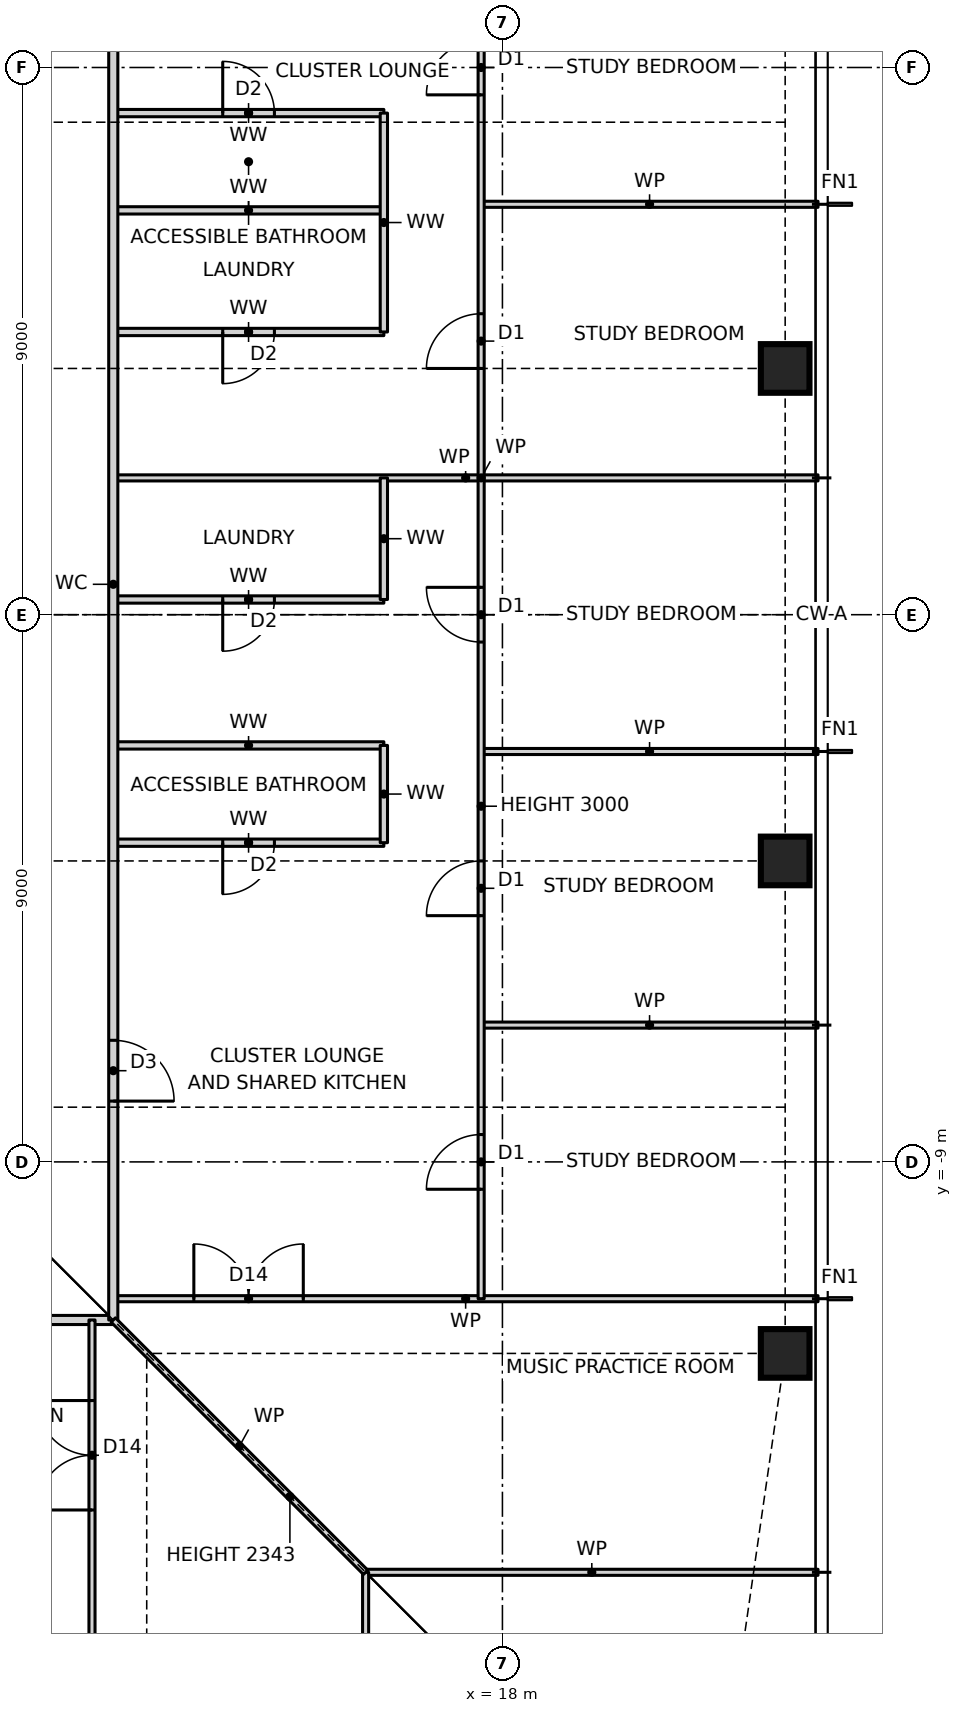
"""IFC4 building model, lengths in metres.
Left out: names, types, materials, properties, quantities, classifications, styles, units other than length and angle.
Written with IfcOpenShell. Run it as: python <this file> out.ifc"""

import sys

from ifc_helpers import new_model, si_unit, direction, frame, frame_2d, origin, origin_2d, place, context, subcontext, project, spatial, rectangle, hollow_rectangle, extrude, element, fill, save


model = new_model("IFC4")
c1 = context("Model", 3, precision=1e-05, world=origin(), true_north=direction((0.0, 1.0)))
c2 = subcontext(c1, "Body", "Model", "MODEL_VIEW")
j1 = project(units=[si_unit("LENGTHUNIT", "METRE"), si_unit("PLANEANGLEUNIT", "RADIAN")], contexts=[c1])
p1 = place(None, origin())
s1 = spatial("IfcSite", under=j1, at=p1, CompositionType="ELEMENT")
p2 = place(p1, origin())
s2 = spatial("IfcBuilding", under=s1, at=p2, CompositionType="ELEMENT")
p3 = place(p2, frame((0.0, 0.0, 39.5)))
s3 = spatial("IfcBuildingStorey", under=s2, at=p3, CompositionType="ELEMENT", Elevation=39.5)
for number, where, z_axis, x_axis in (
    (1, (22.65, -12.15, 0.0), (0.0, 0.0, 1.0), (1.0, 0.0, 0.0)),
    (2, (22.65, -4.05, 0.0), (0.0, 0.0, 1.0), (1.0, 0.0, 0.0)),
    (3, (22.65, 4.05, 0.0), (0.0, 0.0, 1.0), (1.0, 0.0, 0.0)),
):
    element("IfcColumn", number, at=place(p3, frame(where, z_axis=z_axis, x_axis=x_axis)), inside=s3, PredefinedType="COLUMN", context=c2, shape_type="SweptSolid", body=[
        extrude(hollow_rectangle(XDim=0.8, YDim=0.8, WallThickness=0.09, at=origin_2d()), origin(), (0.0, 0.0, 1.0), 3.5),
    ])
p4 = place(p3, frame((15.75, -15.75, 0.0), z_axis=(0.0, 0.0, 1.0), x_axis=(1.0, 0.0, 0.0)))
e4 = element("IfcWall", 4, at=p4, inside=s3, PredefinedType="PARTITIONING", context=c2, shape_type="SweptSolid", body=[
    extrude(rectangle(XDim=7.44, YDim=0.1, at=frame_2d((3.72, 0.0))), origin(), (0.0, 0.0, 1.0), 3.27),
])
p5 = place(p3, frame((-11.6, -11.6, 0.0), z_axis=(0.0, 0.0, 1.0), x_axis=(1.0, 0.0, 0.0)))
e5 = element("IfcWall", 5, at=p5, inside=s3, PredefinedType="PARTITIONING", context=c2, shape_type="SweptSolid", body=[
    extrude(rectangle(XDim=23.2, YDim=0.15, at=frame_2d((11.6, 0.0))), origin(), (0.0, 0.0, 1.0), 3.27),
])
p6 = place(p5, frame((2.975, 0.0, 0.0)))
e6 = element("IfcOpeningElement", 6, at=p6, cuts=e5, PredefinedType="OPENING", context=c2, shape_type="SweptSolid", body=[
    extrude(rectangle(XDim=1.0, YDim=2.1, at=frame_2d((0.5, 1.05))), frame((0.0, 0.085, 0.0), z_axis=(0.0, -1.0, 0.0), x_axis=(1.0, 0.0, 0.0)), (0.0, 0.0, 1.0), 0.17),
])
p7 = place(p5, frame((18.6, 0.0, 0.0)))
e7 = element("IfcOpeningElement", 7, at=p7, cuts=e5, PredefinedType="OPENING", context=c2, shape_type="SweptSolid", body=[
    extrude(rectangle(XDim=1.0, YDim=2.1, at=frame_2d((0.5, 1.05))), frame((0.0, 0.085, 0.0), z_axis=(0.0, -1.0, 0.0), x_axis=(1.0, 0.0, 0.0)), (0.0, 0.0, 1.0), 0.17),
])
p8 = place(p3, frame((11.6, -11.25, 0.0), z_axis=(0.0, 0.0, 1.0), x_axis=(1.0, 0.0, 0.0)))
e8 = element("IfcWall", 8, at=p8, inside=s3, PredefinedType="PARTITIONING", context=c2, shape_type="SweptSolid", body=[
    extrude(rectangle(XDim=11.59, YDim=0.1, at=frame_2d((5.795, 0.0))), origin(), (0.0, 0.0, 1.0), 3.27),
])
p9 = place(p8, frame((1.325, 0.0, 0.0)))
e9 = element("IfcOpeningElement", 9, at=p9, cuts=e8, PredefinedType="OPENING", context=c2, shape_type="SweptSolid", body=[
    extrude(rectangle(XDim=1.8, YDim=2.1, at=frame_2d((0.9, 1.05))), frame((0.0, 0.06, 0.0), z_axis=(0.0, -1.0, 0.0), x_axis=(1.0, 0.0, 0.0)), (0.0, 0.0, 1.0), 0.12),
])
p10 = place(p3, frame((17.65, -6.75, 0.0), z_axis=(0.0, 0.0, 1.0), x_axis=(1.0, 0.0, 0.0)))
e10 = element("IfcWall", 10, at=p10, inside=s3, PredefinedType="PARTITIONING", context=c2, shape_type="SweptSolid", body=[
    extrude(rectangle(XDim=5.54, YDim=0.1, at=frame_2d((2.77, 0.0))), origin(), (0.0, 0.0, 1.0), 3.27),
])
p11 = place(p3, frame((11.6, -3.75, 0.0), z_axis=(0.0, 0.0, 1.0), x_axis=(1.0, 0.0, 0.0)))
e11 = element("IfcWall", 11, at=p11, inside=s3, PredefinedType="PARTITIONING", context=c2, shape_type="SweptSolid", body=[
    extrude(rectangle(XDim=4.45, YDim=0.12, at=frame_2d((2.225, 0.0))), origin(), (0.0, 0.0, 1.0), 3.27),
])
p12 = place(p11, frame((1.8, 0.0, 0.0)))
e12 = element("IfcOpeningElement", 12, at=p12, cuts=e11, PredefinedType="OPENING", context=c2, shape_type="SweptSolid", body=[
    extrude(rectangle(XDim=0.85, YDim=2.1, at=frame_2d((0.425, 1.05))), frame((0.0, 0.07, 0.0), z_axis=(0.0, -1.0, 0.0), x_axis=(1.0, 0.0, 0.0)), (0.0, 0.0, 1.0), 0.14),
])
p13 = place(p3, frame((17.65, -2.25, 0.0), z_axis=(0.0, 0.0, 1.0), x_axis=(1.0, 0.0, 0.0)))
e13 = element("IfcWall", 13, at=p13, inside=s3, PredefinedType="PARTITIONING", context=c2, shape_type="SweptSolid", body=[
    extrude(rectangle(XDim=5.54, YDim=0.1, at=frame_2d((2.77, 0.0))), origin(), (0.0, 0.0, 1.0), 3.27),
])
p14 = place(p3, frame((11.6, -2.15, 0.0), z_axis=(0.0, 0.0, 1.0), x_axis=(1.0, 0.0, 0.0)))
e14 = element("IfcWall", 14, at=p14, inside=s3, PredefinedType="PARTITIONING", context=c2, shape_type="SweptSolid", body=[
    extrude(rectangle(XDim=4.45, YDim=0.12, at=frame_2d((2.225, 0.0))), origin(), (0.0, 0.0, 1.0), 3.27),
])
p15 = place(p3, frame((11.6, 0.25, 0.0), z_axis=(0.0, 0.0, 1.0), x_axis=(1.0, 0.0, 0.0)))
e15 = element("IfcWall", 15, at=p15, inside=s3, PredefinedType="PARTITIONING", context=c2, shape_type="SweptSolid", body=[
    extrude(rectangle(XDim=4.45, YDim=0.12, at=frame_2d((2.225, 0.0))), origin(), (0.0, 0.0, 1.0), 3.27),
])
p16 = place(p15, frame((1.8, 0.0, 0.0)))
e16 = element("IfcOpeningElement", 16, at=p16, cuts=e15, PredefinedType="OPENING", context=c2, shape_type="SweptSolid", body=[
    extrude(rectangle(XDim=0.85, YDim=2.1, at=frame_2d((0.425, 1.05))), frame((0.0, 0.07, 0.0), z_axis=(0.0, -1.0, 0.0), x_axis=(1.0, 0.0, 0.0)), (0.0, 0.0, 1.0), 0.14),
])
p17 = place(p3, frame((11.6, 2.25, 0.0), z_axis=(0.0, 0.0, 1.0), x_axis=(1.0, 0.0, 0.0)))
e17 = element("IfcWall", 17, at=p17, inside=s3, PredefinedType="PARTITIONING", context=c2, shape_type="SweptSolid", body=[
    extrude(rectangle(XDim=11.59, YDim=0.1, at=frame_2d((5.795, 0.0))), origin(), (0.0, 0.0, 1.0), 3.27),
])
p18 = place(p3, frame((11.6, 4.65, 0.0), z_axis=(0.0, 0.0, 1.0), x_axis=(1.0, 0.0, 0.0)))
e18 = element("IfcWall", 18, at=p18, inside=s3, PredefinedType="PARTITIONING", context=c2, shape_type="SweptSolid", body=[
    extrude(rectangle(XDim=4.45, YDim=0.12, at=frame_2d((2.225, 0.0))), origin(), (0.0, 0.0, 1.0), 3.27),
])
p19 = place(p18, frame((1.8, 0.0, 0.0)))
e19 = element("IfcOpeningElement", 19, at=p19, cuts=e18, PredefinedType="OPENING", context=c2, shape_type="SweptSolid", body=[
    extrude(rectangle(XDim=0.85, YDim=2.1, at=frame_2d((0.425, 1.05))), frame((0.0, 0.07, 0.0), z_axis=(0.0, -1.0, 0.0), x_axis=(1.0, 0.0, 0.0)), (0.0, 0.0, 1.0), 0.14),
])
p20 = place(p3, frame((11.6, 6.65, 0.0), z_axis=(0.0, 0.0, 1.0), x_axis=(1.0, 0.0, 0.0)))
e20 = element("IfcWall", 20, at=p20, inside=s3, PredefinedType="PARTITIONING", context=c2, shape_type="SweptSolid", body=[
    extrude(rectangle(XDim=4.45, YDim=0.12, at=frame_2d((2.225, 0.0))), origin(), (0.0, 0.0, 1.0), 3.27),
])
p21 = place(p3, frame((17.65, 6.75, 0.0), z_axis=(0.0, 0.0, 1.0), x_axis=(1.0, 0.0, 0.0)))
e21 = element("IfcWall", 21, at=p21, inside=s3, PredefinedType="PARTITIONING", context=c2, shape_type="SweptSolid", body=[
    extrude(rectangle(XDim=5.54, YDim=0.1, at=frame_2d((2.77, 0.0))), origin(), (0.0, 0.0, 1.0), 3.27),
])
p22 = place(p3, frame((11.6, 8.25, 0.0), z_axis=(0.0, 0.0, 1.0), x_axis=(1.0, 0.0, 0.0)))
e22 = element("IfcWall", 22, at=p22, inside=s3, PredefinedType="PARTITIONING", context=c2, shape_type="SweptSolid", body=[
    extrude(rectangle(XDim=4.45, YDim=0.12, at=frame_2d((2.225, 0.0))), origin(), (0.0, 0.0, 1.0), 3.27),
])
p23 = place(p22, frame((1.8, 0.0, 0.0)))
e23 = element("IfcOpeningElement", 23, at=p23, cuts=e22, PredefinedType="OPENING", context=c2, shape_type="SweptSolid", body=[
    extrude(rectangle(XDim=0.85, YDim=2.1, at=frame_2d((0.425, 1.05))), frame((0.0, 0.07, 0.0), z_axis=(0.0, -1.0, 0.0), x_axis=(1.0, 0.0, 0.0)), (0.0, 0.0, 1.0), 0.14),
])
p24 = place(p3, frame((17.65, -11.25, 0.0), z_axis=(0.0, 0.0, 1.0), x_axis=(0.0, 1.0, 0.0)))
e24 = element("IfcWall", 24, at=p24, inside=s3, PredefinedType="PARTITIONING", context=c2, shape_type="SweptSolid", body=[
    extrude(rectangle(XDim=27.0, YDim=0.1, at=frame_2d((13.5, 0.0))), origin(), (0.0, 0.0, 1.0), 3.0),
])
p25 = place(p24, frame((1.8, 0.0, 0.0)))
e25 = element("IfcOpeningElement", 25, at=p25, cuts=e24, PredefinedType="OPENING", context=c2, shape_type="SweptSolid", body=[
    extrude(rectangle(XDim=0.9, YDim=2.1, at=frame_2d((0.45, 1.05))), frame((0.0, 0.06, 0.0), z_axis=(0.0, -1.0, 0.0), x_axis=(1.0, 0.0, 0.0)), (0.0, 0.0, 1.0), 0.12),
])
p26 = place(p24, frame((6.3, 0.0, 0.0)))
e26 = element("IfcOpeningElement", 26, at=p26, cuts=e24, PredefinedType="OPENING", context=c2, shape_type="SweptSolid", body=[
    extrude(rectangle(XDim=0.9, YDim=2.1, at=frame_2d((0.45, 1.05))), frame((0.0, 0.06, 0.0), z_axis=(0.0, -1.0, 0.0), x_axis=(1.0, 0.0, 0.0)), (0.0, 0.0, 1.0), 0.12),
])
p27 = place(p24, frame((10.8, 0.0, 0.0)))
e27 = element("IfcOpeningElement", 27, at=p27, cuts=e24, PredefinedType="OPENING", context=c2, shape_type="SweptSolid", body=[
    extrude(rectangle(XDim=0.9, YDim=2.1, at=frame_2d((0.45, 1.05))), frame((0.0, 0.06, 0.0), z_axis=(0.0, -1.0, 0.0), x_axis=(1.0, 0.0, 0.0)), (0.0, 0.0, 1.0), 0.12),
])
p28 = place(p24, frame((15.3, 0.0, 0.0)))
e28 = element("IfcOpeningElement", 28, at=p28, cuts=e24, PredefinedType="OPENING", context=c2, shape_type="SweptSolid", body=[
    extrude(rectangle(XDim=0.9, YDim=2.1, at=frame_2d((0.45, 1.05))), frame((0.0, 0.06, 0.0), z_axis=(0.0, -1.0, 0.0), x_axis=(1.0, 0.0, 0.0)), (0.0, 0.0, 1.0), 0.12),
])
p29 = place(p24, frame((19.8, 0.0, 0.0)))
e29 = element("IfcOpeningElement", 29, at=p29, cuts=e24, PredefinedType="OPENING", context=c2, shape_type="SweptSolid", body=[
    extrude(rectangle(XDim=0.9, YDim=2.1, at=frame_2d((0.45, 1.05))), frame((0.0, 0.06, 0.0), z_axis=(0.0, -1.0, 0.0), x_axis=(1.0, 0.0, 0.0)), (0.0, 0.0, 1.0), 0.12),
])
p30 = place(p24, frame((24.3, 0.0, 0.0)))
e30 = element("IfcOpeningElement", 30, at=p30, cuts=e24, PredefinedType="OPENING", context=c2, shape_type="SweptSolid", body=[
    extrude(rectangle(XDim=0.9, YDim=2.1, at=frame_2d((0.45, 1.05))), frame((0.0, 0.06, 0.0), z_axis=(0.0, -1.0, 0.0), x_axis=(1.0, 0.0, 0.0)), (0.0, 0.0, 1.0), 0.12),
])
p31 = place(p3, frame((16.05, -3.75, 0.0), z_axis=(0.0, 0.0, 1.0), x_axis=(0.0, 1.0, 0.0)))
e31 = element("IfcWall", 31, at=p31, inside=s3, PredefinedType="PARTITIONING", context=c2, shape_type="SweptSolid", body=[
    extrude(rectangle(XDim=1.6, YDim=0.12, at=frame_2d((0.8, 0.0))), origin(), (0.0, 0.0, 1.0), 3.27),
])
p32 = place(p3, frame((16.05, 0.25, 0.0), z_axis=(0.0, 0.0, 1.0), x_axis=(0.0, 1.0, 0.0)))
e32 = element("IfcWall", 32, at=p32, inside=s3, PredefinedType="PARTITIONING", context=c2, shape_type="SweptSolid", body=[
    extrude(rectangle(XDim=2.0, YDim=0.12, at=frame_2d((1.0, 0.0))), origin(), (0.0, 0.0, 1.0), 3.27),
])
p33 = place(p3, frame((16.05, 4.65, 0.0), z_axis=(0.0, 0.0, 1.0), x_axis=(0.0, 1.0, 0.0)))
e33 = element("IfcWall", 33, at=p33, inside=s3, PredefinedType="PARTITIONING", context=c2, shape_type="SweptSolid", body=[
    extrude(rectangle(XDim=3.6, YDim=0.12, at=frame_2d((1.8, 0.0))), origin(), (0.0, 0.0, 1.0), 3.27),
])
p34 = place(p3, frame((15.75, -23.19, 0.0), z_axis=(0.0, 0.0, 1.0), x_axis=(0.0, 1.0, 0.0)))
e34 = element("IfcWall", 34, at=p34, inside=s3, PredefinedType="PARTITIONING", context=c2, shape_type="SweptSolid", body=[
    extrude(rectangle(XDim=7.44, YDim=0.1, at=frame_2d((3.72, 0.0))), origin(), (0.0, 0.0, 1.0), 3.27),
])
p35 = place(p34, frame((3.295, 0.0, 0.0)))
e35 = element("IfcOpeningElement", 35, at=p35, cuts=e34, PredefinedType="OPENING", context=c2, shape_type="SweptSolid", body=[
    extrude(rectangle(XDim=0.85, YDim=2.1, at=frame_2d((0.425, 1.05))), frame((0.0, 0.06, 0.0), z_axis=(0.0, -1.0, 0.0), x_axis=(1.0, 0.0, 0.0)), (0.0, 0.0, 1.0), 0.12),
])
p36 = place(p3, frame((11.6, -11.6, 0.0), z_axis=(0.0, 0.0, 1.0), x_axis=(0.0, 1.0, 0.0)))
e36 = element("IfcWall", 36, at=p36, inside=s3, PredefinedType="PARTITIONING", context=c2, shape_type="SweptSolid", body=[
    extrude(rectangle(XDim=24.2, YDim=0.15, at=frame_2d((12.1, 0.0))), origin(), (0.0, 0.0, 1.0), 3.27),
])
p37 = place(p36, frame((3.6, 0.0, 0.0)))
e37 = element("IfcOpeningElement", 37, at=p37, cuts=e36, PredefinedType="OPENING", context=c2, shape_type="SweptSolid", body=[
    extrude(rectangle(XDim=1.0, YDim=2.1, at=frame_2d((0.5, 1.05))), frame((0.0, 0.085, 0.0), z_axis=(0.0, -1.0, 0.0), x_axis=(1.0, 0.0, 0.0)), (0.0, 0.0, 1.0), 0.17),
])
p38 = place(p36, frame((21.025, 0.0, 0.0)))
e38 = element("IfcOpeningElement", 38, at=p38, cuts=e36, PredefinedType="OPENING", context=c2, shape_type="SweptSolid", body=[
    extrude(rectangle(XDim=1.0, YDim=2.1, at=frame_2d((0.5, 1.05))), frame((0.0, 0.085, 0.0), z_axis=(0.0, -1.0, 0.0), x_axis=(1.0, 0.0, 0.0)), (0.0, 0.0, 1.0), 0.17),
])
p39 = place(p3, frame((11.25, -23.19, 0.0), z_axis=(0.0, 0.0, 1.0), x_axis=(0.0, 1.0, 0.0)))
e39 = element("IfcWall", 39, at=p39, inside=s3, PredefinedType="PARTITIONING", context=c2, shape_type="SweptSolid", body=[
    extrude(rectangle(XDim=11.59, YDim=0.1, at=frame_2d((5.795, 0.0))), origin(), (0.0, 0.0, 1.0), 3.27),
])
p40 = place(p39, frame((8.465, 0.0, 0.0)))
e40 = element("IfcOpeningElement", 40, at=p40, cuts=e39, PredefinedType="OPENING", context=c2, shape_type="SweptSolid", body=[
    extrude(rectangle(XDim=1.8, YDim=2.1, at=frame_2d((0.9, 1.05))), frame((0.0, 0.06, 0.0), z_axis=(0.0, -1.0, 0.0), x_axis=(1.0, 0.0, 0.0)), (0.0, 0.0, 1.0), 0.12),
])
p41 = place(p3, frame((15.75, -15.75, 0.0), z_axis=(0.0, 0.0, 1.0), x_axis=(-0.707106781187, 0.707106781187, 0.0)))
e41 = element("IfcWall", 41, at=p41, inside=s3, PredefinedType="PARTITIONING", context=c2, shape_type="SweptSolid", body=[
    extrude(rectangle(XDim=5.869, YDim=0.1, at=frame_2d((2.935, 0.0))), origin(), (0.0, 0.0, 1.0), 2.343),
])
p42 = place(p40, origin())
e42 = element("IfcDoor", 42, at=p42, inside=s3, OperationType="DOUBLE_DOOR_SINGLE_SWING", PredefinedType="DOOR", context=c2, shape_type="SweptSolid", body=[
    extrude(rectangle(XDim=1.8, YDim=2.1, at=frame_2d((0.9, 1.05))), frame((0.0, 0.025, 0.0), z_axis=(0.0, -1.0, 0.0), x_axis=(1.0, 0.0, 0.0)), (0.0, 0.0, 1.0), 0.05),
])
fill(e40, e42)
p43 = place(p9, origin())
e43 = element("IfcDoor", 43, at=p43, inside=s3, OperationType="DOUBLE_DOOR_SINGLE_SWING", PredefinedType="DOOR", context=c2, shape_type="SweptSolid", body=[
    extrude(rectangle(XDim=1.8, YDim=2.1, at=frame_2d((0.9, 1.05))), frame((0.0, 0.025, 0.0), z_axis=(0.0, -1.0, 0.0), x_axis=(1.0, 0.0, 0.0)), (0.0, 0.0, 1.0), 0.05),
])
fill(e9, e43)
p44 = place(p25, origin())
e44 = element("IfcDoor", 44, at=p44, inside=s3, OperationType="SINGLE_SWING_LEFT", PredefinedType="DOOR", context=c2, shape_type="SweptSolid", body=[
    extrude(rectangle(XDim=0.9, YDim=2.1, at=frame_2d((0.45, 1.05))), frame((0.0, 0.025, 0.0), z_axis=(0.0, -1.0, 0.0), x_axis=(1.0, 0.0, 0.0)), (0.0, 0.0, 1.0), 0.05),
])
fill(e25, e44)
p45 = place(p26, origin())
e45 = element("IfcDoor", 45, at=p45, inside=s3, OperationType="SINGLE_SWING_LEFT", PredefinedType="DOOR", context=c2, shape_type="SweptSolid", body=[
    extrude(rectangle(XDim=0.9, YDim=2.1, at=frame_2d((0.45, 1.05))), frame((0.0, 0.025, 0.0), z_axis=(0.0, -1.0, 0.0), x_axis=(1.0, 0.0, 0.0)), (0.0, 0.0, 1.0), 0.05),
])
fill(e26, e45)
p46 = place(p27, origin())
e46 = element("IfcDoor", 46, at=p46, inside=s3, OperationType="SINGLE_SWING_RIGHT", PredefinedType="DOOR", context=c2, shape_type="SweptSolid", body=[
    extrude(rectangle(XDim=0.9, YDim=2.1, at=frame_2d((0.45, 1.05))), frame((0.0, 0.025, 0.0), z_axis=(0.0, -1.0, 0.0), x_axis=(1.0, 0.0, 0.0)), (0.0, 0.0, 1.0), 0.05),
])
fill(e27, e46)
p47 = place(p37, frame((1.0, 0.0, 0.0), z_axis=(0.0, 0.0, 1.0), x_axis=(-1.0, 0.0, 0.0)))
e47 = element("IfcDoor", 47, at=p47, inside=s3, OperationType="SINGLE_SWING_RIGHT", PredefinedType="DOOR", context=c2, shape_type="SweptSolid", body=[
    extrude(rectangle(XDim=1.0, YDim=2.1, at=frame_2d((0.5, 1.05))), frame((0.0, 0.025, 0.0), z_axis=(0.0, -1.0, 0.0), x_axis=(1.0, 0.0, 0.0)), (0.0, 0.0, 1.0), 0.05),
])
fill(e37, e47)
p48 = place(p12, frame((0.85, 0.0, 0.0), z_axis=(0.0, 0.0, 1.0), x_axis=(-1.0, 0.0, 0.0)))
e48 = element("IfcDoor", 48, at=p48, inside=s3, OperationType="SINGLE_SWING_RIGHT", PredefinedType="DOOR", context=c2, shape_type="SweptSolid", body=[
    extrude(rectangle(XDim=0.85, YDim=2.1, at=frame_2d((0.425, 1.05))), frame((0.0, 0.025, 0.0), z_axis=(0.0, -1.0, 0.0), x_axis=(1.0, 0.0, 0.0)), (0.0, 0.0, 1.0), 0.05),
])
fill(e12, e48)
p49 = place(p16, frame((0.85, 0.0, 0.0), z_axis=(0.0, 0.0, 1.0), x_axis=(-1.0, 0.0, 0.0)))
e49 = element("IfcDoor", 49, at=p49, inside=s3, OperationType="SINGLE_SWING_RIGHT", PredefinedType="DOOR", context=c2, shape_type="SweptSolid", body=[
    extrude(rectangle(XDim=0.85, YDim=2.1, at=frame_2d((0.425, 1.05))), frame((0.0, 0.025, 0.0), z_axis=(0.0, -1.0, 0.0), x_axis=(1.0, 0.0, 0.0)), (0.0, 0.0, 1.0), 0.05),
])
fill(e16, e49)
p50 = place(p28, origin())
e50 = element("IfcDoor", 50, at=p50, inside=s3, OperationType="SINGLE_SWING_LEFT", PredefinedType="DOOR", context=c2, shape_type="SweptSolid", body=[
    extrude(rectangle(XDim=0.9, YDim=2.1, at=frame_2d((0.45, 1.05))), frame((0.0, 0.025, 0.0), z_axis=(0.0, -1.0, 0.0), x_axis=(1.0, 0.0, 0.0)), (0.0, 0.0, 1.0), 0.05),
])
fill(e28, e50)
p51 = place(p29, origin())
e51 = element("IfcDoor", 51, at=p51, inside=s3, OperationType="SINGLE_SWING_LEFT", PredefinedType="DOOR", context=c2, shape_type="SweptSolid", body=[
    extrude(rectangle(XDim=0.9, YDim=2.1, at=frame_2d((0.45, 1.05))), frame((0.0, 0.025, 0.0), z_axis=(0.0, -1.0, 0.0), x_axis=(1.0, 0.0, 0.0)), (0.0, 0.0, 1.0), 0.05),
])
fill(e29, e51)
p52 = place(p19, frame((0.85, 0.0, 0.0), z_axis=(0.0, 0.0, 1.0), x_axis=(-1.0, 0.0, 0.0)))
e52 = element("IfcDoor", 52, at=p52, inside=s3, OperationType="SINGLE_SWING_RIGHT", PredefinedType="DOOR", context=c2, shape_type="SweptSolid", body=[
    extrude(rectangle(XDim=0.85, YDim=2.1, at=frame_2d((0.425, 1.05))), frame((0.0, 0.025, 0.0), z_axis=(0.0, -1.0, 0.0), x_axis=(1.0, 0.0, 0.0)), (0.0, 0.0, 1.0), 0.05),
])
fill(e19, e52)
p53 = place(p23, origin())
e53 = element("IfcDoor", 53, at=p53, inside=s3, OperationType="SINGLE_SWING_LEFT", PredefinedType="DOOR", context=c2, shape_type="SweptSolid", body=[
    extrude(rectangle(XDim=0.85, YDim=2.1, at=frame_2d((0.425, 1.05))), frame((0.0, 0.025, 0.0), z_axis=(0.0, -1.0, 0.0), x_axis=(1.0, 0.0, 0.0)), (0.0, 0.0, 1.0), 0.05),
])
fill(e23, e53)
save(model, sys.argv[1])
